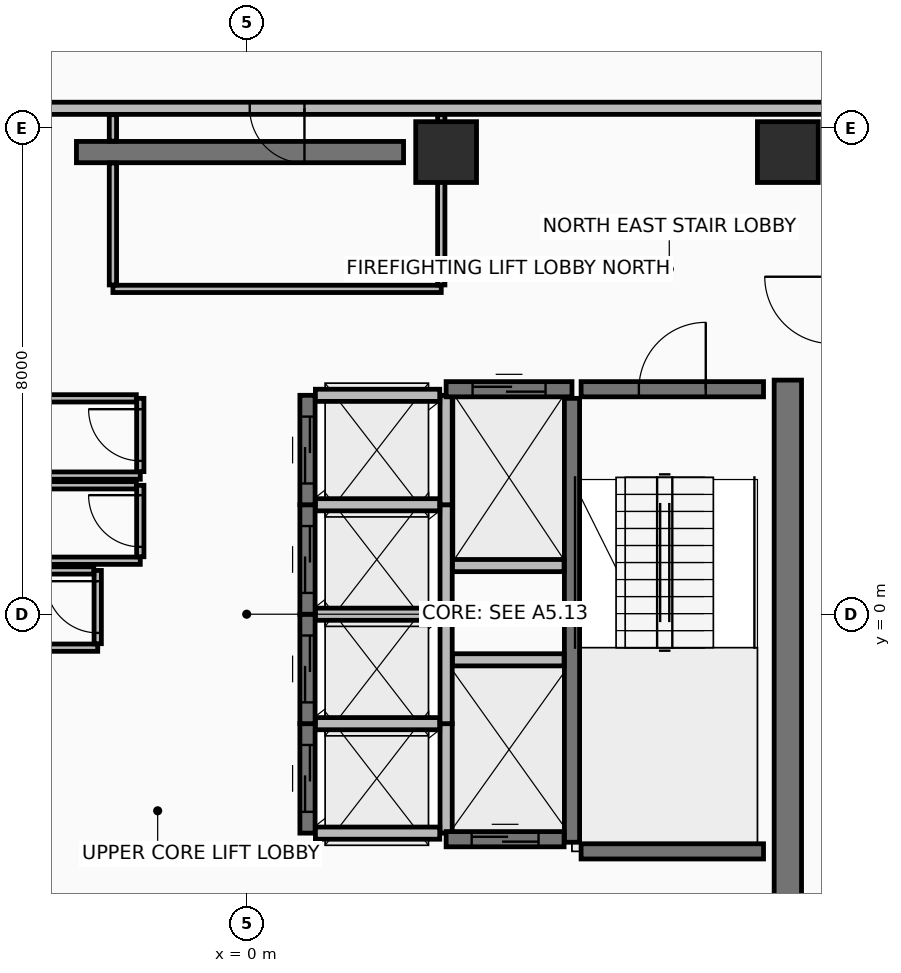
"""IFC4 building model, lengths in metres.
Left out: names, types, materials, properties, quantities, classifications, styles, units other than length and angle.
Written with IfcOpenShell. Run it as: python <this file> out.ifc"""

import sys

from ifc_helpers import new_model, si_unit, direction, frame, frame_2d, origin, origin_2d, place, context, subcontext, project, spatial, rectangle, extrude, element, fill, save


model = new_model("IFC4")
c1 = context("Model", 3, precision=1e-05, world=origin(), true_north=direction((0.0, 1.0)))
c2 = subcontext(c1, "Body", "Model", "MODEL_VIEW")
j1 = project(units=[si_unit("LENGTHUNIT", "METRE"), si_unit("PLANEANGLEUNIT", "RADIAN")], contexts=[c1])
p1 = place(None, origin())
s1 = spatial("IfcSite", under=j1, at=p1, CompositionType="ELEMENT")
p2 = place(p1, origin())
s2 = spatial("IfcBuilding", under=s1, at=p2, CompositionType="ELEMENT")
p3 = place(p2, frame((0.0, 0.0, 298.0)))
s3 = spatial("IfcBuildingStorey", under=s2, at=p3, CompositionType="ELEMENT", Elevation=298.0)
for number, where, z_axis, x_axis in (
    (1, (8.9, 7.6, 0.0), (0.0, 0.0, 1.0), (1.0, 0.0, 0.0)),
    (2, (3.28, 7.6, 0.0), (0.0, 0.0, 1.0), (1.0, 0.0, 0.0)),
):
    element("IfcColumn", number, at=place(p3, frame(where, z_axis=z_axis, x_axis=x_axis)), inside=s3, PredefinedType="COLUMN", context=c2, shape_type="SweptSolid", body=[
        extrude(rectangle(XDim=1.0, YDim=1.0, at=origin_2d()), origin(), (0.0, 0.0, 1.0), 4.15),
    ])
p4 = place(p3, frame((-2.8, 7.6, 0.0), z_axis=(0.0, 0.0, 1.0), x_axis=(1.0, 0.0, 0.0)))
e3 = element("IfcWall", 3, at=p4, inside=s3, PredefinedType="SHEAR", context=c2, shape_type="SweptSolid", body=[
    extrude(rectangle(XDim=5.38, YDim=0.35, at=frame_2d((2.69, 0.0))), origin(), (0.0, 0.0, 1.0), 3.95),
])
p5 = place(p3, frame((8.9, -6.85, 0.0), z_axis=(0.0, 0.0, 1.0), x_axis=(0.0, 1.0, 0.0)))
e4 = element("IfcWall", 4, at=p5, inside=s3, PredefinedType="SHEAR", context=c2, shape_type="SweptSolid", body=[
    extrude(rectangle(XDim=10.7, YDim=0.45, at=frame_2d((5.35, 0.0))), origin(), (0.0, 0.0, 1.0), 3.95),
])
p6 = place(p3, frame((9.62, 8.32, 0.0), z_axis=(0.0, 0.0, 1.0), x_axis=(-1.0, 0.0, 0.0)))
e5 = element("IfcWall", 5, at=p6, inside=s3, PredefinedType="PARTITIONING", context=c2, shape_type="SweptSolid", body=[
    extrude(rectangle(XDim=19.24, YDim=0.2, at=frame_2d((9.62, 0.0))), origin(), (0.0, 0.0, 1.0), 3.445),
])
p7 = place(p6, frame((8.67, 0.0, 0.0)))
e6 = element("IfcOpeningElement", 6, at=p7, cuts=e5, PredefinedType="OPENING", context=c2, shape_type="SweptSolid", body=[
    extrude(rectangle(XDim=0.9, YDim=2.1, at=frame_2d((0.45, 1.05))), frame((0.0, 0.11, 0.0), z_axis=(0.0, -1.0, 0.0), x_axis=(1.0, 0.0, 0.0)), (0.0, 0.0, 1.0), 0.22),
])
p8 = place(p6, frame((15.745, 0.0, 0.0)))
e7 = element("IfcOpeningElement", 7, at=p8, cuts=e5, PredefinedType="OPENING", context=c2, shape_type="SweptSolid", body=[
    extrude(rectangle(XDim=0.9, YDim=2.1, at=frame_2d((0.45, 1.05))), frame((0.0, 0.11, 0.0), z_axis=(0.0, -1.0, 0.0), x_axis=(1.0, 0.0, 0.0)), (0.0, 0.0, 1.0), 0.22),
])
p9 = place(p6, frame((13.795, 0.0, 0.0)))
e8 = element("IfcOpeningElement", 8, at=p9, cuts=e5, PredefinedType="OPENING", context=c2, shape_type="SweptSolid", body=[
    extrude(rectangle(XDim=0.9, YDim=2.1, at=frame_2d((0.45, 1.05))), frame((0.0, 0.11, 0.0), z_axis=(0.0, -1.0, 0.0), x_axis=(1.0, 0.0, 0.0)), (0.0, 0.0, 1.0), 0.22),
])
p10 = place(p3, frame((5.35, -3.75, 0.0), z_axis=(0.0, 0.0, 1.0), x_axis=(0.0, 1.0, 0.0)))
e9 = element("IfcWall", 9, at=p10, inside=s3, PredefinedType="SHEAR", context=c2, shape_type="SweptSolid", body=[
    extrude(rectangle(XDim=7.3, YDim=0.25, at=frame_2d((3.65, 0.0))), origin(), (0.0, 0.0, 1.0), 3.95),
])
p11 = place(p3, frame((5.5, 3.7, 0.0), z_axis=(0.0, 0.0, 1.0), x_axis=(1.0, 0.0, 0.0)))
e10 = element("IfcWall", 10, at=p11, inside=s3, PredefinedType="SHEAR", context=c2, shape_type="SweptSolid", body=[
    extrude(rectangle(XDim=3.0, YDim=0.25, at=frame_2d((1.5, 0.0))), origin(), (0.0, 0.0, 1.0), 3.95),
])
p12 = place(p11, frame((0.95, 0.0, 0.0)))
e11 = element("IfcOpeningElement", 11, at=p12, cuts=e10, PredefinedType="OPENING", context=c2, shape_type="SweptSolid", body=[
    extrude(rectangle(XDim=1.1, YDim=2.15, at=frame_2d((0.55, 1.075))), frame((0.0, 0.135, 0.0), z_axis=(0.0, -1.0, 0.0), x_axis=(1.0, 0.0, 0.0)), (0.0, 0.0, 1.0), 0.27),
])
p13 = place(p3, frame((5.5, -3.9, 0.0), z_axis=(0.0, 0.0, 1.0), x_axis=(1.0, 0.0, 0.0)))
e12 = element("IfcWall", 12, at=p13, inside=s3, PredefinedType="SHEAR", context=c2, shape_type="SweptSolid", body=[
    extrude(rectangle(XDim=3.0, YDim=0.25, at=frame_2d((1.5, 0.0))), origin(), (0.0, 0.0, 1.0), 3.95),
])
p14 = place(p3, frame((1.0, -3.6, 0.0), z_axis=(0.0, 0.0, 1.0), x_axis=(0.0, 1.0, 0.0)))
e13 = element("IfcWall", 13, at=p14, inside=s3, PredefinedType="SHEAR", context=c2, shape_type="SweptSolid", body=[
    extrude(rectangle(XDim=1.8, YDim=0.25, at=frame_2d((0.9, 0.0))), origin(), (0.0, 0.0, 1.0), 3.95),
])
p15 = place(p14, frame((0.35, 0.0, 0.0)))
e14 = element("IfcOpeningElement", 14, at=p15, cuts=e13, PredefinedType="OPENING", context=c2, shape_type="SweptSolid", body=[
    extrude(rectangle(XDim=1.1, YDim=2.2, at=frame_2d((0.55, 1.1))), frame((0.0, 0.135, 0.0), z_axis=(0.0, -1.0, 0.0), x_axis=(1.0, 0.0, 0.0)), (0.0, 0.0, 1.0), 0.27),
])
p16 = place(p3, frame((3.28, -3.6, 0.0), z_axis=(0.0, 0.0, 1.0), x_axis=(0.0, 1.0, 0.0)))
e15 = element("IfcWall", 15, at=p16, inside=s3, PredefinedType="PARTITIONING", context=c2, shape_type="SweptSolid", body=[
    extrude(rectangle(XDim=1.8, YDim=0.2, at=frame_2d((0.9, 0.0))), origin(), (0.0, 0.0, 1.0), 3.95),
])
for number, where, z_axis, x_axis in (
    (16, (1.13, -3.6, 0.0), (0.0, 0.0, 1.0), (1.0, 0.0, 0.0)),
    (17, (1.13, -1.8, 0.0), (0.0, 0.0, 1.0), (1.0, 0.0, 0.0)),
):
    element("IfcWall", number, at=place(p3, frame(where, z_axis=z_axis, x_axis=x_axis)), inside=s3, PredefinedType="PARTITIONING", context=c2, shape_type="SweptSolid", body=[
        extrude(rectangle(XDim=2.045, YDim=0.2, at=frame_2d((1.022, 0.0))), origin(), (0.0, 0.0, 1.0), 3.95),
    ])
p17 = place(p3, frame((1.0, -1.8, 0.0), z_axis=(0.0, 0.0, 1.0), x_axis=(0.0, 1.0, 0.0)))
e18 = element("IfcWall", 18, at=p17, inside=s3, PredefinedType="SHEAR", context=c2, shape_type="SweptSolid", body=[
    extrude(rectangle(XDim=1.8, YDim=0.25, at=frame_2d((0.9, 0.0))), origin(), (0.0, 0.0, 1.0), 3.95),
])
p18 = place(p17, frame((0.35, 0.0, 0.0)))
e19 = element("IfcOpeningElement", 19, at=p18, cuts=e18, PredefinedType="OPENING", context=c2, shape_type="SweptSolid", body=[
    extrude(rectangle(XDim=1.1, YDim=2.2, at=frame_2d((0.55, 1.1))), frame((0.0, 0.135, 0.0), z_axis=(0.0, -1.0, 0.0), x_axis=(1.0, 0.0, 0.0)), (0.0, 0.0, 1.0), 0.27),
])
p19 = place(p3, frame((3.28, -1.8, 0.0), z_axis=(0.0, 0.0, 1.0), x_axis=(0.0, 1.0, 0.0)))
e20 = element("IfcWall", 20, at=p19, inside=s3, PredefinedType="PARTITIONING", context=c2, shape_type="SweptSolid", body=[
    extrude(rectangle(XDim=1.8, YDim=0.2, at=frame_2d((0.9, 0.0))), origin(), (0.0, 0.0, 1.0), 3.95),
])
p20 = place(p3, frame((1.13, 0.0, 0.0), z_axis=(0.0, 0.0, 1.0), x_axis=(1.0, 0.0, 0.0)))
e21 = element("IfcWall", 21, at=p20, inside=s3, PredefinedType="PARTITIONING", context=c2, shape_type="SweptSolid", body=[
    extrude(rectangle(XDim=2.045, YDim=0.2, at=frame_2d((1.022, 0.0))), origin(), (0.0, 0.0, 1.0), 3.95),
])
p21 = place(p3, frame((1.0, 0.0, 0.0), z_axis=(0.0, 0.0, 1.0), x_axis=(0.0, 1.0, 0.0)))
e22 = element("IfcWall", 22, at=p21, inside=s3, PredefinedType="SHEAR", context=c2, shape_type="SweptSolid", body=[
    extrude(rectangle(XDim=1.8, YDim=0.25, at=frame_2d((0.9, 0.0))), origin(), (0.0, 0.0, 1.0), 3.95),
])
p22 = place(p21, frame((0.35, 0.0, 0.0)))
e23 = element("IfcOpeningElement", 23, at=p22, cuts=e22, PredefinedType="OPENING", context=c2, shape_type="SweptSolid", body=[
    extrude(rectangle(XDim=1.1, YDim=2.2, at=frame_2d((0.55, 1.1))), frame((0.0, 0.135, 0.0), z_axis=(0.0, -1.0, 0.0), x_axis=(1.0, 0.0, 0.0)), (0.0, 0.0, 1.0), 0.27),
])
p23 = place(p3, frame((3.28, 0.0, 0.0), z_axis=(0.0, 0.0, 1.0), x_axis=(0.0, 1.0, 0.0)))
e24 = element("IfcWall", 24, at=p23, inside=s3, PredefinedType="PARTITIONING", context=c2, shape_type="SweptSolid", body=[
    extrude(rectangle(XDim=1.8, YDim=0.2, at=frame_2d((0.9, 0.0))), origin(), (0.0, 0.0, 1.0), 3.95),
])
p24 = place(p3, frame((1.13, 1.8, 0.0), z_axis=(0.0, 0.0, 1.0), x_axis=(1.0, 0.0, 0.0)))
e25 = element("IfcWall", 25, at=p24, inside=s3, PredefinedType="PARTITIONING", context=c2, shape_type="SweptSolid", body=[
    extrude(rectangle(XDim=2.045, YDim=0.2, at=frame_2d((1.022, 0.0))), origin(), (0.0, 0.0, 1.0), 3.95),
])
p25 = place(p3, frame((1.0, 1.8, 0.0), z_axis=(0.0, 0.0, 1.0), x_axis=(0.0, 1.0, 0.0)))
e26 = element("IfcWall", 26, at=p25, inside=s3, PredefinedType="SHEAR", context=c2, shape_type="SweptSolid", body=[
    extrude(rectangle(XDim=1.8, YDim=0.25, at=frame_2d((0.9, 0.0))), origin(), (0.0, 0.0, 1.0), 3.95),
])
p26 = place(p25, frame((0.35, 0.0, 0.0)))
e27 = element("IfcOpeningElement", 27, at=p26, cuts=e26, PredefinedType="OPENING", context=c2, shape_type="SweptSolid", body=[
    extrude(rectangle(XDim=1.1, YDim=2.2, at=frame_2d((0.55, 1.1))), frame((0.0, 0.135, 0.0), z_axis=(0.0, -1.0, 0.0), x_axis=(1.0, 0.0, 0.0)), (0.0, 0.0, 1.0), 0.27),
])
p27 = place(p3, frame((3.28, 1.8, 0.0), z_axis=(0.0, 0.0, 1.0), x_axis=(0.0, 1.0, 0.0)))
e28 = element("IfcWall", 28, at=p27, inside=s3, PredefinedType="PARTITIONING", context=c2, shape_type="SweptSolid", body=[
    extrude(rectangle(XDim=1.8, YDim=0.2, at=frame_2d((0.9, 0.0))), origin(), (0.0, 0.0, 1.0), 3.95),
])
p28 = place(p3, frame((1.13, 3.6, 0.0), z_axis=(0.0, 0.0, 1.0), x_axis=(1.0, 0.0, 0.0)))
e29 = element("IfcWall", 29, at=p28, inside=s3, PredefinedType="PARTITIONING", context=c2, shape_type="SweptSolid", body=[
    extrude(rectangle(XDim=2.045, YDim=0.2, at=frame_2d((1.022, 0.0))), origin(), (0.0, 0.0, 1.0), 3.245),
])
p29 = place(p3, frame((3.28, 3.7, 0.0), z_axis=(0.0, 0.0, 1.0), x_axis=(1.0, 0.0, 0.0)))
e30 = element("IfcWall", 30, at=p29, inside=s3, PredefinedType="SHEAR", context=c2, shape_type="SweptSolid", body=[
    extrude(rectangle(XDim=2.07, YDim=0.25, at=frame_2d((1.035, 0.0))), origin(), (0.0, 0.0, 1.0), 3.95),
])
p30 = place(p29, frame((0.435, 0.0, 0.0)))
e31 = element("IfcOpeningElement", 31, at=p30, cuts=e30, PredefinedType="OPENING", context=c2, shape_type="SweptSolid", body=[
    extrude(rectangle(XDim=1.2, YDim=2.2, at=frame_2d((0.6, 1.1))), frame((0.0, 0.135, 0.0), z_axis=(0.0, -1.0, 0.0), x_axis=(1.0, 0.0, 0.0)), (0.0, 0.0, 1.0), 0.27),
])
p31 = place(p3, frame((3.385, 0.8, 0.0), z_axis=(0.0, 0.0, 1.0), x_axis=(1.0, 0.0, 0.0)))
e32 = element("IfcWall", 32, at=p31, inside=s3, PredefinedType="PARTITIONING", context=c2, shape_type="SweptSolid", body=[
    extrude(rectangle(XDim=1.835, YDim=0.2, at=frame_2d((0.917, 0.0))), origin(), (0.0, 0.0, 1.0), 3.95),
])
p32 = place(p3, frame((3.28, -3.7, 0.0), z_axis=(0.0, 0.0, 1.0), x_axis=(1.0, 0.0, 0.0)))
e33 = element("IfcWall", 33, at=p32, inside=s3, PredefinedType="SHEAR", context=c2, shape_type="SweptSolid", body=[
    extrude(rectangle(XDim=1.94, YDim=0.25, at=frame_2d((0.97, 0.0))), origin(), (0.0, 0.0, 1.0), 3.95),
])
p33 = place(p32, frame((0.42, 0.0, 0.0)))
e34 = element("IfcOpeningElement", 34, at=p33, cuts=e33, PredefinedType="OPENING", context=c2, shape_type="SweptSolid", body=[
    extrude(rectangle(XDim=1.1, YDim=2.2, at=frame_2d((0.55, 1.1))), frame((0.0, 0.135, 0.0), z_axis=(0.0, -1.0, 0.0), x_axis=(1.0, 0.0, 0.0)), (0.0, 0.0, 1.0), 0.27),
])
p34 = place(p3, frame((3.385, -0.75, 0.0), z_axis=(0.0, 0.0, 1.0), x_axis=(1.0, 0.0, 0.0)))
e35 = element("IfcWall", 35, at=p34, inside=s3, PredefinedType="PARTITIONING", context=c2, shape_type="SweptSolid", body=[
    extrude(rectangle(XDim=1.835, YDim=0.2, at=frame_2d((0.917, 0.0))), origin(), (0.0, 0.0, 1.0), 3.95),
])
p35 = place(p3, frame((-5.22, 2.28, 0.0), z_axis=(0.0, 0.0, 1.0), x_axis=(1.0, 0.0, 0.0)))
e36 = element("IfcWall", 36, at=p35, inside=s3, PredefinedType="PARTITIONING", context=c2, shape_type="SweptSolid", body=[
    extrude(rectangle(XDim=3.47, YDim=0.12, at=frame_2d((1.735, 0.0))), origin(), (0.0, 0.0, 1.0), 3.95),
])
p36 = place(p3, frame((-1.75, 2.345, 0.0), z_axis=(0.0, 0.0, 1.0), x_axis=(0.0, 1.0, 0.0)))
e37 = element("IfcWall", 37, at=p36, inside=s3, PredefinedType="PARTITIONING", context=c2, shape_type="SweptSolid", body=[
    extrude(rectangle(XDim=1.205, YDim=0.12, at=frame_2d((0.603, 0.0))), origin(), (0.0, 0.0, 1.0), 3.95),
])
p37 = place(p36, frame((0.177, 0.0, 0.0)))
e38 = element("IfcOpeningElement", 38, at=p37, cuts=e37, PredefinedType="OPENING", context=c2, shape_type="SweptSolid", body=[
    extrude(rectangle(XDim=0.85, YDim=2.1, at=frame_2d((0.425, 1.05))), frame((0.0, 0.07, 0.0), z_axis=(0.0, -1.0, 0.0), x_axis=(1.0, 0.0, 0.0)), (0.0, 0.0, 1.0), 0.14),
])
p38 = place(p3, frame((-1.815, 3.55, 0.0), z_axis=(0.0, 0.0, 1.0), x_axis=(-1.0, 0.0, 0.0)))
e39 = element("IfcWall", 39, at=p38, inside=s3, PredefinedType="PARTITIONING", context=c2, shape_type="SweptSolid", body=[
    extrude(rectangle(XDim=3.405, YDim=0.12, at=frame_2d((1.703, 0.0))), origin(), (0.0, 0.0, 1.0), 3.95),
])
p39 = place(p3, frame((-5.22, 0.88, 0.0), z_axis=(0.0, 0.0, 1.0), x_axis=(1.0, 0.0, 0.0)))
e40 = element("IfcWall", 40, at=p39, inside=s3, PredefinedType="PARTITIONING", context=c2, shape_type="SweptSolid", body=[
    extrude(rectangle(XDim=3.47, YDim=0.12, at=frame_2d((1.735, 0.0))), origin(), (0.0, 0.0, 1.0), 3.95),
])
p40 = place(p3, frame((-1.75, 0.945, 0.0), z_axis=(0.0, 0.0, 1.0), x_axis=(0.0, 1.0, 0.0)))
e41 = element("IfcWall", 41, at=p40, inside=s3, PredefinedType="PARTITIONING", context=c2, shape_type="SweptSolid", body=[
    extrude(rectangle(XDim=1.175, YDim=0.12, at=frame_2d((0.587, 0.0))), origin(), (0.0, 0.0, 1.0), 3.95),
])
p41 = place(p40, frame((0.163, 0.0, 0.0)))
e42 = element("IfcOpeningElement", 42, at=p41, cuts=e41, PredefinedType="OPENING", context=c2, shape_type="SweptSolid", body=[
    extrude(rectangle(XDim=0.85, YDim=2.1, at=frame_2d((0.425, 1.05))), frame((0.0, 0.07, 0.0), z_axis=(0.0, -1.0, 0.0), x_axis=(1.0, 0.0, 0.0)), (0.0, 0.0, 1.0), 0.14),
])
p42 = place(p3, frame((-1.815, 2.12, 0.0), z_axis=(0.0, 0.0, 1.0), x_axis=(-1.0, 0.0, 0.0)))
e43 = element("IfcWall", 43, at=p42, inside=s3, PredefinedType="PARTITIONING", context=c2, shape_type="SweptSolid", body=[
    extrude(rectangle(XDim=3.405, YDim=0.12, at=frame_2d((1.703, 0.0))), origin(), (0.0, 0.0, 1.0), 3.95),
])
p43 = place(p3, frame((-5.22, -0.55, 0.0), z_axis=(0.0, 0.0, 1.0), x_axis=(1.0, 0.0, 0.0)))
e44 = element("IfcWall", 44, at=p43, inside=s3, PredefinedType="PARTITIONING", context=c2, shape_type="SweptSolid", body=[
    extrude(rectangle(XDim=2.77, YDim=0.12, at=frame_2d((1.385, 0.0))), origin(), (0.0, 0.0, 1.0), 3.95),
])
p44 = place(p3, frame((-2.45, -0.485, 0.0), z_axis=(0.0, 0.0, 1.0), x_axis=(0.0, 1.0, 0.0)))
e45 = element("IfcWall", 45, at=p44, inside=s3, PredefinedType="PARTITIONING", context=c2, shape_type="SweptSolid", body=[
    extrude(rectangle(XDim=1.205, YDim=0.12, at=frame_2d((0.603, 0.0))), origin(), (0.0, 0.0, 1.0), 3.95),
])
p45 = place(p44, frame((0.178, 0.0, 0.0)))
e46 = element("IfcOpeningElement", 46, at=p45, cuts=e45, PredefinedType="OPENING", context=c2, shape_type="SweptSolid", body=[
    extrude(rectangle(XDim=0.85, YDim=2.1, at=frame_2d((0.425, 1.05))), frame((0.0, 0.07, 0.0), z_axis=(0.0, -1.0, 0.0), x_axis=(1.0, 0.0, 0.0)), (0.0, 0.0, 1.0), 0.14),
])
p46 = place(p3, frame((-2.515, 0.72, 0.0), z_axis=(0.0, 0.0, 1.0), x_axis=(-1.0, 0.0, 0.0)))
e47 = element("IfcWall", 47, at=p46, inside=s3, PredefinedType="PARTITIONING", context=c2, shape_type="SweptSolid", body=[
    extrude(rectangle(XDim=2.705, YDim=0.12, at=frame_2d((1.353, 0.0))), origin(), (0.0, 0.0, 1.0), 3.95),
])
p47 = place(p3, frame((-2.2, 5.35, 0.0), z_axis=(0.0, 0.0, 1.0), x_axis=(1.0, 0.0, 0.0)))
e48 = element("IfcWall", 48, at=p47, inside=s3, PredefinedType="PARTITIONING", context=c2, shape_type="SweptSolid", body=[
    extrude(rectangle(XDim=5.4, YDim=0.12, at=frame_2d((2.7, 0.0))), origin(), (0.0, 0.0, 1.0), 3.245),
])
p48 = place(p3, frame((3.2, 5.415, 0.0), z_axis=(0.0, 0.0, 1.0), x_axis=(0.0, 1.0, 0.0)))
e49 = element("IfcWall", 49, at=p48, inside=s3, PredefinedType="PARTITIONING", context=c2, shape_type="SweptSolid", body=[
    extrude(rectangle(XDim=2.8, YDim=0.12, at=frame_2d((1.4, 0.0))), origin(), (0.0, 0.0, 1.0), 3.245),
])
p49 = place(p3, frame((-2.2, 8.215, 0.0), z_axis=(0.0, 0.0, 1.0), x_axis=(0.0, -1.0, 0.0)))
e50 = element("IfcWall", 50, at=p49, inside=s3, PredefinedType="PARTITIONING", context=c2, shape_type="SweptSolid", body=[
    extrude(rectangle(XDim=0.435, YDim=0.12, at=frame_2d((0.218, 0.0))), origin(), (0.0, 0.0, 1.0), 3.245),
])
p50 = place(p3, frame((-2.2, 7.42, 0.0), z_axis=(0.0, 0.0, 1.0), x_axis=(0.0, -1.0, 0.0)))
e51 = element("IfcWall", 51, at=p50, inside=s3, PredefinedType="PARTITIONING", context=c2, shape_type="SweptSolid", body=[
    extrude(rectangle(XDim=2.005, YDim=0.12, at=frame_2d((1.002, 0.0))), origin(), (0.0, 0.0, 1.0), 3.245),
])
p51 = place(p12, frame((1.1, 0.0, 0.0), z_axis=(0.0, 0.0, 1.0), x_axis=(-1.0, 0.0, 0.0)))
e52 = element("IfcDoor", 52, at=p51, inside=s3, OperationType="SINGLE_SWING_LEFT", PredefinedType="DOOR", context=c2, shape_type="SweptSolid", body=[
    extrude(rectangle(XDim=1.1, YDim=2.15, at=frame_2d((0.55, 1.075))), frame((0.0, 0.025, 0.0), z_axis=(0.0, -1.0, 0.0), x_axis=(1.0, 0.0, 0.0)), (0.0, 0.0, 1.0), 0.05),
])
fill(e11, e52)
p52 = place(p15, origin())
e53 = element("IfcDoor", 53, at=p52, inside=s3, OperationType="SLIDING_TO_LEFT", PredefinedType="DOOR", context=c2, shape_type="SweptSolid", body=[
    extrude(rectangle(XDim=1.1, YDim=2.2, at=frame_2d((0.55, 1.1))), frame((0.0, 0.025, 0.0), z_axis=(0.0, -1.0, 0.0), x_axis=(1.0, 0.0, 0.0)), (0.0, 0.0, 1.0), 0.05),
])
fill(e14, e53)
p53 = place(p18, origin())
e54 = element("IfcDoor", 54, at=p53, inside=s3, OperationType="SLIDING_TO_LEFT", PredefinedType="DOOR", context=c2, shape_type="SweptSolid", body=[
    extrude(rectangle(XDim=1.1, YDim=2.2, at=frame_2d((0.55, 1.1))), frame((0.0, 0.025, 0.0), z_axis=(0.0, -1.0, 0.0), x_axis=(1.0, 0.0, 0.0)), (0.0, 0.0, 1.0), 0.05),
])
fill(e19, e54)
p54 = place(p22, origin())
e55 = element("IfcDoor", 55, at=p54, inside=s3, OperationType="SLIDING_TO_LEFT", PredefinedType="DOOR", context=c2, shape_type="SweptSolid", body=[
    extrude(rectangle(XDim=1.1, YDim=2.2, at=frame_2d((0.55, 1.1))), frame((0.0, 0.025, 0.0), z_axis=(0.0, -1.0, 0.0), x_axis=(1.0, 0.0, 0.0)), (0.0, 0.0, 1.0), 0.05),
])
fill(e23, e55)
p55 = place(p26, origin())
e56 = element("IfcDoor", 56, at=p55, inside=s3, OperationType="SLIDING_TO_LEFT", PredefinedType="DOOR", context=c2, shape_type="SweptSolid", body=[
    extrude(rectangle(XDim=1.1, YDim=2.2, at=frame_2d((0.55, 1.1))), frame((0.0, 0.025, 0.0), z_axis=(0.0, -1.0, 0.0), x_axis=(1.0, 0.0, 0.0)), (0.0, 0.0, 1.0), 0.05),
])
fill(e27, e56)
p56 = place(p30, origin())
e57 = element("IfcDoor", 57, at=p56, inside=s3, OperationType="SLIDING_TO_RIGHT", PredefinedType="DOOR", context=c2, shape_type="SweptSolid", body=[
    extrude(rectangle(XDim=1.2, YDim=2.2, at=frame_2d((0.6, 1.1))), frame((0.0, 0.025, 0.0), z_axis=(0.0, -1.0, 0.0), x_axis=(1.0, 0.0, 0.0)), (0.0, 0.0, 1.0), 0.05),
])
fill(e31, e57)
p57 = place(p33, origin())
e58 = element("IfcDoor", 58, at=p57, inside=s3, OperationType="SLIDING_TO_LEFT", PredefinedType="DOOR", context=c2, shape_type="SweptSolid", body=[
    extrude(rectangle(XDim=1.1, YDim=2.2, at=frame_2d((0.55, 1.1))), frame((0.0, 0.025, 0.0), z_axis=(0.0, -1.0, 0.0), x_axis=(1.0, 0.0, 0.0)), (0.0, 0.0, 1.0), 0.05),
])
fill(e34, e58)
p58 = place(p37, frame((0.85, 0.0, 0.0), z_axis=(0.0, 0.0, 1.0), x_axis=(-1.0, 0.0, 0.0)))
e59 = element("IfcDoor", 59, at=p58, inside=s3, OperationType="SINGLE_SWING_RIGHT", PredefinedType="DOOR", context=c2, shape_type="SweptSolid", body=[
    extrude(rectangle(XDim=0.85, YDim=2.1, at=frame_2d((0.425, 1.05))), frame((0.0, 0.025, 0.0), z_axis=(0.0, -1.0, 0.0), x_axis=(1.0, 0.0, 0.0)), (0.0, 0.0, 1.0), 0.05),
])
fill(e38, e59)
p59 = place(p41, frame((0.85, 0.0, 0.0), z_axis=(0.0, 0.0, 1.0), x_axis=(-1.0, 0.0, 0.0)))
e60 = element("IfcDoor", 60, at=p59, inside=s3, OperationType="SINGLE_SWING_RIGHT", PredefinedType="DOOR", context=c2, shape_type="SweptSolid", body=[
    extrude(rectangle(XDim=0.85, YDim=2.1, at=frame_2d((0.425, 1.05))), frame((0.0, 0.025, 0.0), z_axis=(0.0, -1.0, 0.0), x_axis=(1.0, 0.0, 0.0)), (0.0, 0.0, 1.0), 0.05),
])
fill(e42, e60)
p60 = place(p45, frame((0.85, 0.0, 0.0), z_axis=(0.0, 0.0, 1.0), x_axis=(-1.0, 0.0, 0.0)))
e61 = element("IfcDoor", 61, at=p60, inside=s3, OperationType="SINGLE_SWING_RIGHT", PredefinedType="DOOR", context=c2, shape_type="SweptSolid", body=[
    extrude(rectangle(XDim=0.85, YDim=2.1, at=frame_2d((0.425, 1.05))), frame((0.0, 0.025, 0.0), z_axis=(0.0, -1.0, 0.0), x_axis=(1.0, 0.0, 0.0)), (0.0, 0.0, 1.0), 0.05),
])
fill(e46, e61)
p61 = place(p7, origin())
e62 = element("IfcDoor", 62, at=p61, inside=s3, OperationType="SINGLE_SWING_LEFT", PredefinedType="DOOR", context=c2, shape_type="SweptSolid", body=[
    extrude(rectangle(XDim=0.9, YDim=2.1, at=frame_2d((0.45, 1.05))), frame((0.0, 0.025, 0.0), z_axis=(0.0, -1.0, 0.0), x_axis=(1.0, 0.0, 0.0)), (0.0, 0.0, 1.0), 0.05),
])
fill(e6, e62)
save(model, sys.argv[1])
